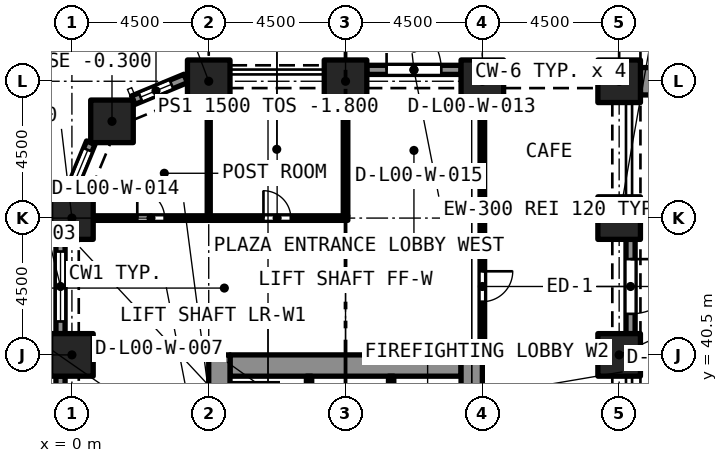
"""IFC4 building model, lengths in metres.
Left out: names, types, materials, properties, quantities, classifications, styles, units other than length and angle.
Written with IfcOpenShell. Run it as: python <this file> out.ifc"""

import sys

from ifc_helpers import new_model, si_unit, direction, frame, frame_2d, origin, origin_2d, place, context, subcontext, project, spatial, rectangle, extrude, element, fill, save


model = new_model("IFC4")
c1 = context("Model", 3, precision=1e-05, world=origin(), true_north=direction((0.0, 1.0)))
c2 = subcontext(c1, "Body", "Model", "MODEL_VIEW")
j1 = project(units=[si_unit("LENGTHUNIT", "METRE"), si_unit("PLANEANGLEUNIT", "RADIAN")], contexts=[c1])
p1 = place(None, origin())
s1 = spatial("IfcSite", under=j1, at=p1, CompositionType="ELEMENT")
p2 = place(p1, origin())
s2 = spatial("IfcBuilding", under=s1, at=p2, CompositionType="ELEMENT")
p3 = place(p2, origin())
s3 = spatial("IfcBuildingStorey", under=s2, at=p3, CompositionType="ELEMENT", Elevation=0.0)
for number, where, z_axis, x_axis in (
    (1, (0.0, 40.5, -0.3), (0.0, 0.0, 1.0), (1.0, 0.0, 0.0)),
    (2, (18.0, 40.5, -0.3), (0.0, 0.0, 1.0), (1.0, 0.0, 0.0)),
    (3, (0.0, 45.0, -0.3), (0.0, 0.0, 1.0), (1.0, 0.0, 0.0)),
    (4, (18.0, 45.0, -0.3), (0.0, 0.0, 1.0), (1.0, 0.0, 0.0)),
    (5, (1.318, 48.182, -0.3), (0.0, 0.0, 1.0), (1.0, 0.0, 0.0)),
    (6, (4.5, 49.5, -0.3), (0.0, 0.0, 1.0), (1.0, 0.0, 0.0)),
    (7, (9.0, 49.5, -0.3), (0.0, 0.0, 1.0), (1.0, 0.0, 0.0)),
    (8, (13.5, 49.5, -0.3), (0.0, 0.0, 1.0), (1.0, 0.0, 0.0)),
    (9, (18.0, 49.5, -0.3), (0.0, 0.0, 1.0), (1.0, 0.0, 0.0)),
):
    element("IfcColumn", number, at=place(p3, frame(where, z_axis=z_axis, x_axis=x_axis)), inside=s3, PredefinedType="COLUMN", context=c2, shape_type="SweptSolid", body=[
        extrude(rectangle(XDim=1.4, YDim=1.4, at=origin_2d()), origin(), (0.0, 0.0, 1.0), 6.3),
    ])
p4 = place(p3, frame((5.2, 40.15, -0.3), z_axis=(0.0, 0.0, 1.0), x_axis=(1.0, 0.0, 0.0)))
e10 = element("IfcWall", 10, at=p4, inside=s3, PredefinedType="SOLIDWALL", context=c2, shape_type="SweptSolid", body=[
    extrude(rectangle(XDim=7.6, YDim=0.7, at=frame_2d((3.8, 0.0))), origin(), (0.0, 0.0, 1.0), 6.3),
])
p5 = place(p3, frame((4.85, 27.0, -0.3), z_axis=(0.0, 0.0, 1.0), x_axis=(0.0, 1.0, 0.0)))
e11 = element("IfcWall", 11, at=p5, inside=s3, PredefinedType="SOLIDWALL", context=c2, shape_type="SweptSolid", body=[
    extrude(rectangle(XDim=13.5, YDim=0.7, at=frame_2d((6.75, 0.0))), origin(), (0.0, 0.0, 1.0), 6.3),
])
p6 = place(p5, frame((0.75, 0.0, 0.3)))
e12 = element("IfcOpeningElement", 12, at=p6, cuts=e11, PredefinedType="OPENING", context=c2, shape_type="SweptSolid", body=[
    extrude(rectangle(XDim=1.1, YDim=2.1, at=frame_2d((0.55, 1.05))), frame((0.0, 0.36, 0.0), z_axis=(0.0, -1.0, 0.0), x_axis=(1.0, 0.0, 0.0)), (0.0, 0.0, 1.0), 0.72),
])
p7 = place(p5, frame((8.95, 0.0, 0.3)))
e13 = element("IfcOpeningElement", 13, at=p7, cuts=e11, PredefinedType="OPENING", context=c2, shape_type="SweptSolid", body=[
    extrude(rectangle(XDim=1.2, YDim=2.1, at=frame_2d((0.6, 1.05))), frame((0.0, 0.36, 0.0), z_axis=(0.0, -1.0, 0.0), x_axis=(1.0, 0.0, 0.0)), (0.0, 0.0, 1.0), 0.72),
])
p8 = place(p3, frame((13.15, 27.0, -0.3), z_axis=(0.0, 0.0, 1.0), x_axis=(0.0, 1.0, 0.0)))
e14 = element("IfcWall", 14, at=p8, inside=s3, PredefinedType="SOLIDWALL", context=c2, shape_type="SweptSolid", body=[
    extrude(rectangle(XDim=13.5, YDim=0.7, at=frame_2d((6.75, 0.0))), origin(), (0.0, 0.0, 1.0), 6.3),
])
p9 = place(p8, frame((0.75, 0.0, 0.3)))
e15 = element("IfcOpeningElement", 15, at=p9, cuts=e14, PredefinedType="OPENING", context=c2, shape_type="SweptSolid", body=[
    extrude(rectangle(XDim=1.1, YDim=2.1, at=frame_2d((0.55, 1.05))), frame((0.0, 0.36, 0.0), z_axis=(0.0, -1.0, 0.0), x_axis=(1.0, 0.0, 0.0)), (0.0, 0.0, 1.0), 0.72),
])
p10 = place(p8, frame((11.1, 0.0, 0.3)))
e16 = element("IfcOpeningElement", 16, at=p10, cuts=e14, PredefinedType="OPENING", context=c2, shape_type="SweptSolid", body=[
    extrude(rectangle(XDim=1.1, YDim=2.1, at=frame_2d((0.55, 1.05))), frame((0.0, 0.36, 0.0), z_axis=(0.0, -1.0, 0.0), x_axis=(1.0, 0.0, 0.0)), (0.0, 0.0, 1.0), 0.72),
])
p11 = place(p8, frame((8.95, 0.0, 0.3)))
e17 = element("IfcOpeningElement", 17, at=p11, cuts=e14, PredefinedType="OPENING", context=c2, shape_type="SweptSolid", body=[
    extrude(rectangle(XDim=1.2, YDim=2.1, at=frame_2d((0.6, 1.05))), frame((0.0, 0.36, 0.0), z_axis=(0.0, -1.0, 0.0), x_axis=(1.0, 0.0, 0.0)), (0.0, 0.0, 1.0), 0.72),
])
p12 = place(p3, frame((9.7, 49.875, 0.0), z_axis=(0.0, 0.0, 1.0), x_axis=(1.0, 0.0, 0.0)))
e18 = element("IfcWall", 18, at=p12, inside=s3, PredefinedType="SOLIDWALL", context=c2, shape_type="SweptSolid", body=[
    extrude(rectangle(XDim=3.1, YDim=0.3, at=frame_2d((1.55, 0.0))), origin(), (0.0, 0.0, 1.0), 6.0),
])
p13 = place(p12, frame((0.65, 0.0, 0.0)))
e19 = element("IfcOpeningElement", 19, at=p13, cuts=e18, PredefinedType="OPENING", context=c2, shape_type="SweptSolid", body=[
    extrude(rectangle(XDim=1.8, YDim=2.4, at=frame_2d((0.9, 1.2))), frame((0.0, 0.16, 0.0), z_axis=(0.0, -1.0, 0.0), x_axis=(1.0, 0.0, 0.0)), (0.0, 0.0, 1.0), 0.32),
])
p14 = place(p3, frame((2.02, 48.878, 0.0), z_axis=(0.0, 0.0, 1.0), x_axis=(0.923903565336, 0.38262540684, 0.0)))
e20 = element("IfcWall", 20, at=p14, inside=s3, PredefinedType="SOLIDWALL", context=c2, shape_type="SweptSolid", body=[
    extrude(rectangle(XDim=1.865, YDim=0.3, at=frame_2d((0.933, 0.0))), origin(), (0.0, 0.0, 1.0), 6.0),
])
p15 = place(p14, frame((0.258, 0.0, 0.45)))
e21 = element("IfcOpeningElement", 21, at=p15, cuts=e20, PredefinedType="OPENING", context=c2, shape_type="SweptSolid", body=[
    extrude(rectangle(XDim=1.1, YDim=3.3, at=frame_2d((0.55, 1.65))), frame((0.0, 0.16, 0.0), z_axis=(0.0, -1.0, 0.0), x_axis=(1.0, 0.0, 0.0)), (0.0, 0.0, 1.0), 0.32),
])
p16 = place(p3, frame((-0.092, 45.757, 0.0), z_axis=(0.0, 0.0, 1.0), x_axis=(0.382737135771, 0.923857286003, 0.0)))
e22 = element("IfcWall", 22, at=p16, inside=s3, PredefinedType="SOLIDWALL", context=c2, shape_type="SweptSolid", body=[
    extrude(rectangle(XDim=1.865, YDim=0.3, at=frame_2d((0.933, 0.0))), origin(), (0.0, 0.0, 1.0), 6.0),
])
p17 = place(p16, frame((0.508, 0.0, 0.45)))
e23 = element("IfcOpeningElement", 23, at=p17, cuts=e22, PredefinedType="OPENING", context=c2, shape_type="SweptSolid", body=[
    extrude(rectangle(XDim=1.1, YDim=3.3, at=frame_2d((0.55, 1.65))), frame((0.0, 0.16, 0.0), z_axis=(0.0, -1.0, 0.0), x_axis=(1.0, 0.0, 0.0)), (0.0, 0.0, 1.0), 0.32),
])
p18 = place(p3, frame((-0.375, 41.2, 0.0), z_axis=(0.0, 0.0, 1.0), x_axis=(0.0, 1.0, 0.0)))
e24 = element("IfcWall", 24, at=p18, inside=s3, PredefinedType="SOLIDWALL", context=c2, shape_type="SweptSolid", body=[
    extrude(rectangle(XDim=3.1, YDim=0.3, at=frame_2d((1.55, 0.0))), origin(), (0.0, 0.0, 1.0), 6.0),
])
p19 = place(p18, frame((0.4, 0.0, 0.45)))
e25 = element("IfcOpeningElement", 25, at=p19, cuts=e24, PredefinedType="OPENING", context=c2, shape_type="SweptSolid", body=[
    extrude(rectangle(XDim=2.3, YDim=3.3, at=frame_2d((1.15, 1.65))), frame((0.0, 0.16, 0.0), z_axis=(0.0, -1.0, 0.0), x_axis=(1.0, 0.0, 0.0)), (0.0, 0.0, 1.0), 0.32),
])
p20 = place(p3, frame((-0.375, 36.7, 0.0), z_axis=(0.0, 0.0, 1.0), x_axis=(0.0, 1.0, 0.0)))
e26 = element("IfcWall", 26, at=p20, inside=s3, PredefinedType="SOLIDWALL", context=c2, shape_type="SweptSolid", body=[
    extrude(rectangle(XDim=3.1, YDim=0.3, at=frame_2d((1.55, 0.0))), origin(), (0.0, 0.0, 1.0), 6.0),
])
p21 = place(p20, frame((0.4, 0.0, 0.45)))
e27 = element("IfcOpeningElement", 27, at=p21, cuts=e26, PredefinedType="OPENING", context=c2, shape_type="SweptSolid", body=[
    extrude(rectangle(XDim=2.3, YDim=3.3, at=frame_2d((1.15, 1.65))), frame((0.0, 0.16, 0.0), z_axis=(0.0, -1.0, 0.0), x_axis=(1.0, 0.0, 0.0)), (0.0, 0.0, 1.0), 0.32),
])
p22 = place(p3, frame((18.375, 44.3, 0.0), z_axis=(0.0, 0.0, 1.0), x_axis=(0.0, -1.0, 0.0)))
e28 = element("IfcWall", 28, at=p22, inside=s3, PredefinedType="SOLIDWALL", context=c2, shape_type="SweptSolid", body=[
    extrude(rectangle(XDim=3.1, YDim=0.3, at=frame_2d((1.55, 0.0))), origin(), (0.0, 0.0, 1.0), 6.0),
])
p23 = place(p22, frame((0.65, 0.0, 0.0)))
e29 = element("IfcOpeningElement", 29, at=p23, cuts=e28, PredefinedType="OPENING", context=c2, shape_type="SweptSolid", body=[
    extrude(rectangle(XDim=1.8, YDim=2.4, at=frame_2d((0.9, 1.2))), frame((0.0, 0.16, 0.0), z_axis=(0.0, -1.0, 0.0), x_axis=(1.0, 0.0, 0.0)), (0.0, 0.0, 1.0), 0.32),
])
p24 = place(p3, frame((18.7, 49.5, 0.0), z_axis=(0.0, 0.0, 1.0), x_axis=(1.0, 0.0, 0.0)))
e30 = element("IfcWall", 30, at=p24, inside=s3, PredefinedType="SOLIDWALL", context=c2, shape_type="SweptSolid", body=[
    extrude(rectangle(XDim=2.25, YDim=0.9, at=frame_2d((1.125, 0.0))), origin(), (0.0, 0.0, 1.0), 10.5),
])
p25 = place(p3, frame((7.8, 37.5, 0.0), z_axis=(0.0, 0.0, 1.0), x_axis=(0.0, 1.0, 0.0)))
e31 = element("IfcWall", 31, at=p25, inside=s3, PredefinedType="SOLIDWALL", context=c2, shape_type="SweptSolid", body=[
    extrude(rectangle(XDim=2.3, YDim=0.175, at=frame_2d((1.15, 0.0))), origin(), (0.0, 0.0, 1.0), 5.65),
])
p26 = place(p3, frame((10.5, 37.5, 0.0), z_axis=(0.0, 0.0, 1.0), x_axis=(0.0, 1.0, 0.0)))
e32 = element("IfcWall", 32, at=p26, inside=s3, PredefinedType="SOLIDWALL", context=c2, shape_type="SweptSolid", body=[
    extrude(rectangle(XDim=2.3, YDim=0.175, at=frame_2d((1.15, 0.0))), origin(), (0.0, 0.0, 1.0), 5.65),
])
p27 = place(p26, frame((0.65, 0.0, 0.0)))
e33 = element("IfcOpeningElement", 33, at=p27, cuts=e32, PredefinedType="OPENING", context=c2, shape_type="SweptSolid", body=[
    extrude(rectangle(XDim=1.0, YDim=2.1, at=frame_2d((0.5, 1.05))), frame((0.0, 0.097, 0.0), z_axis=(0.0, -1.0, 0.0), x_axis=(1.0, 0.0, 0.0)), (0.0, 0.0, 1.0), 0.195),
])
p28 = place(p3, frame((13.575, 40.5, 0.0), z_axis=(0.0, 0.0, 1.0), x_axis=(1.0, 0.0, 0.0)))
e34 = element("IfcWall", 34, at=p28, inside=s3, PredefinedType="PARTITIONING", context=c2, shape_type="SweptSolid", body=[
    extrude(rectangle(XDim=3.725, YDim=0.15, at=frame_2d((1.863, 0.0))), origin(), (0.0, 0.0, 1.0), 5.65),
])
p29 = place(p3, frame((13.5, 45.0, 0.0), z_axis=(0.0, 0.0, 1.0), x_axis=(0.0, 1.0, 0.0)))
e35 = element("IfcWall", 35, at=p29, inside=s3, PredefinedType="PARTITIONING", context=c2, shape_type="SweptSolid", body=[
    extrude(rectangle(XDim=3.8, YDim=0.15, at=frame_2d((1.9, 0.0))), origin(), (0.0, 0.0, 1.0), 5.65),
])
p30 = place(p3, frame((13.5, 45.0, 0.0), z_axis=(0.0, 0.0, 1.0), x_axis=(0.0, -1.0, 0.0)))
e36 = element("IfcWall", 36, at=p30, inside=s3, PredefinedType="PARTITIONING", context=c2, shape_type="SweptSolid", body=[
    extrude(rectangle(XDim=4.575, YDim=0.15, at=frame_2d((2.288, 0.0))), origin(), (0.0, 0.0, 1.0), 5.65),
])
p31 = place(p30, frame((1.75, 0.0, 0.0)))
e37 = element("IfcOpeningElement", 37, at=p31, cuts=e36, PredefinedType="OPENING", context=c2, shape_type="SweptSolid", body=[
    extrude(rectangle(XDim=1.0, YDim=2.1, at=frame_2d((0.5, 1.05))), frame((0.0, 0.085, 0.0), z_axis=(0.0, -1.0, 0.0), x_axis=(1.0, 0.0, 0.0)), (0.0, 0.0, 1.0), 0.17),
])
p32 = place(p3, frame((4.5, 45.075, 0.0), z_axis=(0.0, 0.0, 1.0), x_axis=(0.0, 1.0, 0.0)))
e38 = element("IfcWall", 38, at=p32, inside=s3, PredefinedType="PARTITIONING", context=c2, shape_type="SweptSolid", body=[
    extrude(rectangle(XDim=3.725, YDim=0.1, at=frame_2d((1.863, 0.0))), origin(), (0.0, 0.0, 1.0), 5.65),
])
p33 = place(p3, frame((0.7, 45.0, 0.0), z_axis=(0.0, 0.0, 1.0), x_axis=(1.0, 0.0, 0.0)))
e39 = element("IfcWall", 39, at=p33, inside=s3, PredefinedType="PARTITIONING", context=c2, shape_type="SweptSolid", body=[
    extrude(rectangle(XDim=3.8, YDim=0.15, at=frame_2d((1.9, 0.0))), origin(), (0.0, 0.0, 1.0), 5.65),
])
p34 = place(p33, frame((1.45, 0.0, 0.0)))
e40 = element("IfcOpeningElement", 40, at=p34, cuts=e39, PredefinedType="OPENING", context=c2, shape_type="SweptSolid", body=[
    extrude(rectangle(XDim=0.9, YDim=2.1, at=frame_2d((0.45, 1.05))), frame((0.0, 0.085, 0.0), z_axis=(0.0, -1.0, 0.0), x_axis=(1.0, 0.0, 0.0)), (0.0, 0.0, 1.0), 0.17),
])
p35 = place(p3, frame((9.0, 45.075, 0.0), z_axis=(0.0, 0.0, 1.0), x_axis=(0.0, 1.0, 0.0)))
e41 = element("IfcWall", 41, at=p35, inside=s3, PredefinedType="PARTITIONING", context=c2, shape_type="SweptSolid", body=[
    extrude(rectangle(XDim=3.725, YDim=0.15, at=frame_2d((1.863, 0.0))), origin(), (0.0, 0.0, 1.0), 5.65),
])
p36 = place(p3, frame((4.5, 45.0, 0.0), z_axis=(0.0, 0.0, 1.0), x_axis=(1.0, 0.0, 0.0)))
e42 = element("IfcWall", 42, at=p36, inside=s3, PredefinedType="PARTITIONING", context=c2, shape_type="SweptSolid", body=[
    extrude(rectangle(XDim=4.575, YDim=0.15, at=frame_2d((2.288, 0.0))), origin(), (0.0, 0.0, 1.0), 5.65),
])
p37 = place(p36, frame((1.8, 0.0, 0.0)))
e43 = element("IfcOpeningElement", 43, at=p37, cuts=e42, PredefinedType="OPENING", context=c2, shape_type="SweptSolid", body=[
    extrude(rectangle(XDim=0.9, YDim=2.1, at=frame_2d((0.45, 1.05))), frame((0.0, 0.085, 0.0), z_axis=(0.0, -1.0, 0.0), x_axis=(1.0, 0.0, 0.0)), (0.0, 0.0, 1.0), 0.17),
])
p38 = place(p15, origin())
e44 = element("IfcWindow", 44, at=p38, inside=s3, PartitioningType="SINGLE_PANEL", PredefinedType="WINDOW", context=c2, shape_type="SweptSolid", body=[
    extrude(rectangle(XDim=1.1, YDim=3.3, at=frame_2d((0.55, 1.65))), frame((0.0, 0.03, 0.0), z_axis=(0.0, -1.0, 0.0), x_axis=(1.0, 0.0, 0.0)), (0.0, 0.0, 1.0), 0.06),
])
fill(e21, e44)
p39 = place(p17, origin())
e45 = element("IfcWindow", 45, at=p39, inside=s3, PartitioningType="SINGLE_PANEL", PredefinedType="WINDOW", context=c2, shape_type="SweptSolid", body=[
    extrude(rectangle(XDim=1.1, YDim=3.3, at=frame_2d((0.55, 1.65))), frame((0.0, 0.03, 0.0), z_axis=(0.0, -1.0, 0.0), x_axis=(1.0, 0.0, 0.0)), (0.0, 0.0, 1.0), 0.06),
])
fill(e23, e45)
p40 = place(p19, origin())
e46 = element("IfcWindow", 46, at=p40, inside=s3, PartitioningType="SINGLE_PANEL", PredefinedType="WINDOW", context=c2, shape_type="SweptSolid", body=[
    extrude(rectangle(XDim=2.3, YDim=3.3, at=frame_2d((1.15, 1.65))), frame((0.0, 0.03, 0.0), z_axis=(0.0, -1.0, 0.0), x_axis=(1.0, 0.0, 0.0)), (0.0, 0.0, 1.0), 0.06),
])
fill(e25, e46)
p41 = place(p23, origin())
e47 = element("IfcDoor", 47, at=p41, inside=s3, OperationType="SINGLE_SWING_LEFT", PredefinedType="DOOR", context=c2, shape_type="SweptSolid", body=[
    extrude(rectangle(XDim=1.8, YDim=2.4, at=frame_2d((0.9, 1.2))), frame((0.0, 0.025, 0.0), z_axis=(0.0, -1.0, 0.0), x_axis=(1.0, 0.0, 0.0)), (0.0, 0.0, 1.0), 0.05),
])
fill(e29, e47)
p42 = place(p13, origin())
e48 = element("IfcDoor", 48, at=p42, inside=s3, OperationType="SINGLE_SWING_LEFT", PredefinedType="DOOR", context=c2, shape_type="SweptSolid", body=[
    extrude(rectangle(XDim=1.8, YDim=2.4, at=frame_2d((0.9, 1.2))), frame((0.0, 0.025, 0.0), z_axis=(0.0, -1.0, 0.0), x_axis=(1.0, 0.0, 0.0)), (0.0, 0.0, 1.0), 0.05),
])
fill(e19, e48)
p43 = place(p31, origin())
e49 = element("IfcDoor", 49, at=p43, inside=s3, OperationType="SINGLE_SWING_LEFT", PredefinedType="DOOR", context=c2, shape_type="SweptSolid", body=[
    extrude(rectangle(XDim=1.0, YDim=2.1, at=frame_2d((0.5, 1.05))), frame((0.0, 0.025, 0.0), z_axis=(0.0, -1.0, 0.0), x_axis=(1.0, 0.0, 0.0)), (0.0, 0.0, 1.0), 0.05),
])
fill(e37, e49)
p44 = place(p34, origin())
e50 = element("IfcDoor", 50, at=p44, inside=s3, OperationType="SINGLE_SWING_RIGHT", PredefinedType="DOOR", context=c2, shape_type="SweptSolid", body=[
    extrude(rectangle(XDim=0.9, YDim=2.1, at=frame_2d((0.45, 1.05))), frame((0.0, 0.025, 0.0), z_axis=(0.0, -1.0, 0.0), x_axis=(1.0, 0.0, 0.0)), (0.0, 0.0, 1.0), 0.05),
])
fill(e40, e50)
p45 = place(p37, origin())
e51 = element("IfcDoor", 51, at=p45, inside=s3, OperationType="SINGLE_SWING_LEFT", PredefinedType="DOOR", context=c2, shape_type="SweptSolid", body=[
    extrude(rectangle(XDim=0.9, YDim=2.1, at=frame_2d((0.45, 1.05))), frame((0.0, 0.025, 0.0), z_axis=(0.0, -1.0, 0.0), x_axis=(1.0, 0.0, 0.0)), (0.0, 0.0, 1.0), 0.05),
])
fill(e43, e51)
save(model, sys.argv[1])
